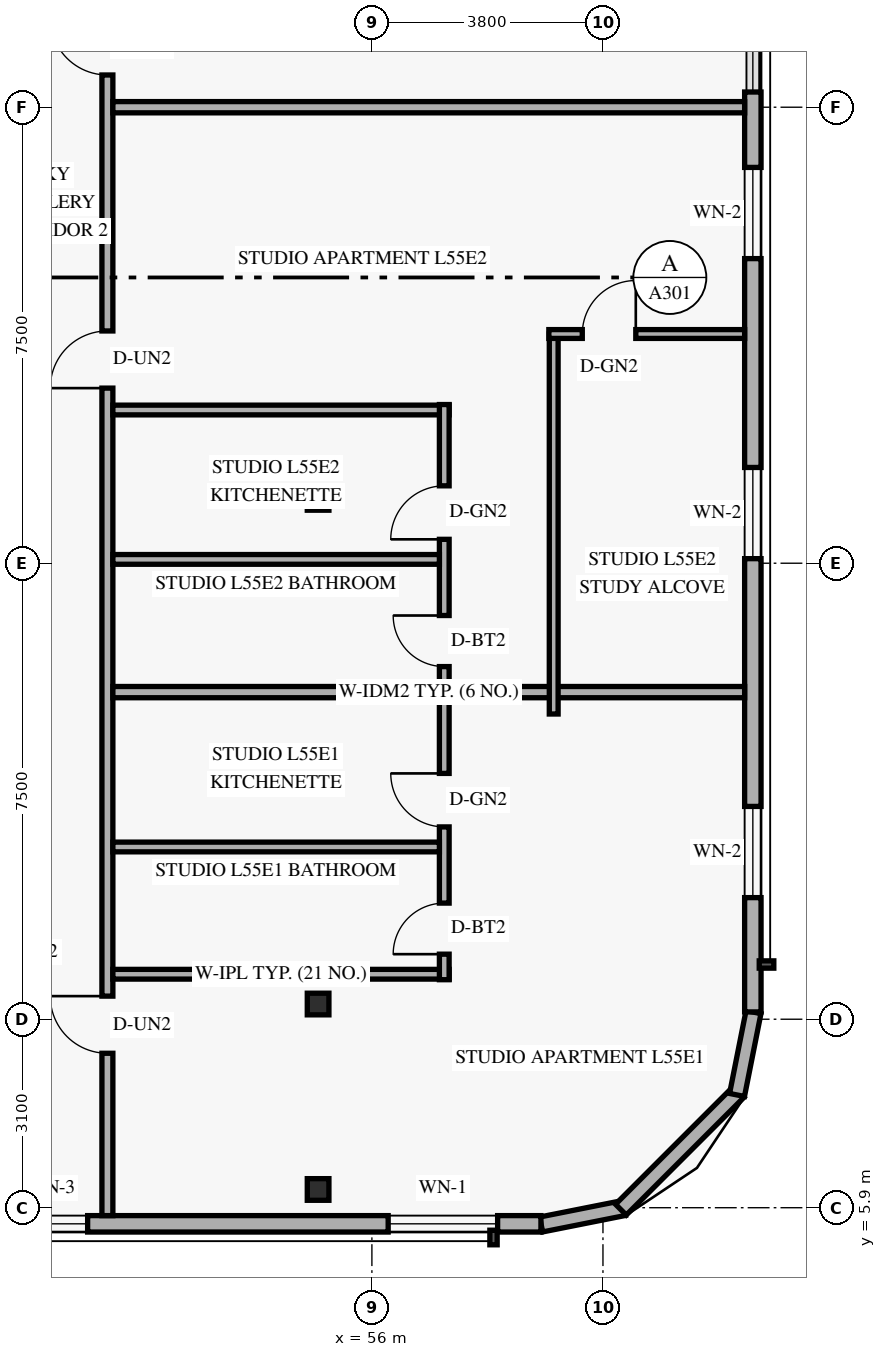
"""IFC4 building model, lengths in metres.
Left out: names, types, materials, properties, quantities, classifications, styles, units other than length and angle.
Written with IfcOpenShell. Run it as: python <this file> out.ifc"""

import sys

from ifc_helpers import new_model, si_unit, direction, frame, frame_2d, origin, origin_2d, place, context, subcontext, project, spatial, rectangle, hollow_rectangle, extrude, element, fill, save


model = new_model("IFC4")
c1 = context("Model", 3, precision=1e-05, world=origin(), true_north=direction((0.0, 1.0)))
c2 = subcontext(c1, "Body", "Model", "MODEL_VIEW")
j1 = project(units=[si_unit("LENGTHUNIT", "METRE"), si_unit("PLANEANGLEUNIT", "RADIAN")], contexts=[c1])
p1 = place(None, origin())
s1 = spatial("IfcSite", under=j1, at=p1, CompositionType="ELEMENT")
p2 = place(p1, origin())
s2 = spatial("IfcBuilding", under=s1, at=p2, CompositionType="ELEMENT")
p3 = place(p2, frame((0.0, 0.0, 213.0)))
s3 = spatial("IfcBuildingStorey", under=s2, at=p3, CompositionType="ELEMENT", Elevation=213.0)
for number, where, z_axis, x_axis in (
    (1, (55.011, 6.2, 0.0), (0.058, 0.0, 0.998), (0.0, 1.0, 0.0)),
    (2, (55.011, 9.25, 0.0), (0.058, 0.0, 0.998), (0.0, 1.0, 0.0)),
    (3, (55.011, 17.55, 0.0), (0.058, 0.0, 0.998), (0.0, 1.0, 0.0)),
):
    element("IfcColumn", number, at=place(p3, frame(where, z_axis=z_axis, x_axis=x_axis)), inside=s3, PredefinedType="COLUMN", context=c2, shape_type="SweptSolid", body=[
        extrude(hollow_rectangle(XDim=0.356, YDim=0.356, WallThickness=0.016, at=origin_2d()), origin(), (0.0, 0.0, 1.0), 3.606),
    ])
p4 = place(p3, frame((58.783, 5.624, 0.0), z_axis=(0.0, 0.0, 1.0), x_axis=(0.980809899341, 0.19496651342, 0.0)))
e4 = element("IfcWall", 4, at=p4, inside=s3, PredefinedType="SOLIDWALL", context=c2, shape_type="SweptSolid", body=[
    extrude(rectangle(XDim=1.389, YDim=0.25, at=frame_2d((0.694, 0.0))), origin(), (0.0, 0.0, 1.0), 3.36),
])
p5 = place(p3, frame((60.095, 5.868, 0.0), z_axis=(0.0, 0.0, 1.0), x_axis=(0.707106781187, 0.707106781187, 0.0)))
e5 = element("IfcWall", 5, at=p5, inside=s3, PredefinedType="SOLIDWALL", context=c2, shape_type="SweptSolid", body=[
    extrude(rectangle(XDim=2.739, YDim=0.25, at=frame_2d((1.37, 0.0))), origin(), (0.0, 0.0, 1.0), 3.36),
])
p6 = place(p3, frame((62.005, 7.754, 0.0), z_axis=(0.0, 0.0, 1.0), x_axis=(0.195135625965, 0.9807762678, 0.0)))
e6 = element("IfcWall", 6, at=p6, inside=s3, PredefinedType="SOLIDWALL", context=c2, shape_type="SweptSolid", body=[
    extrude(rectangle(XDim=1.389, YDim=0.25, at=frame_2d((0.694, 0.0))), origin(), (0.0, 0.0, 1.0), 3.36),
])
p7 = place(p3, frame((25.82, 5.635, 0.0), z_axis=(0.0, 0.0, 1.0), x_axis=(1.0, 0.0, 0.0)))
e7 = element("IfcWall", 7, at=p7, inside=s3, PredefinedType="SOLIDWALL", context=c2, shape_type="SweptSolid", body=[
    extrude(rectangle(XDim=32.96, YDim=0.27, at=frame_2d((16.48, 0.0))), origin(), (0.0, 0.0, 1.0), 3.36),
])
p8 = place(p7, frame((3.57, 0.0, 0.85)))
e8 = element("IfcOpeningElement", 8, at=p8, cuts=e7, PredefinedType="OPENING", context=c2, shape_type="SweptSolid", body=[
    extrude(rectangle(XDim=1.8, YDim=1.6, at=frame_2d((0.9, 0.8))), frame((0.0, 0.145, 0.0), z_axis=(0.0, -1.0, 0.0), x_axis=(1.0, 0.0, 0.0)), (0.0, 0.0, 1.0), 0.29),
])
p9 = place(p7, frame((18.725, 0.0, 0.85)))
e9 = element("IfcOpeningElement", 9, at=p9, cuts=e7, PredefinedType="OPENING", context=c2, shape_type="SweptSolid", body=[
    extrude(rectangle(XDim=1.8, YDim=1.6, at=frame_2d((0.9, 0.8))), frame((0.0, 0.145, 0.0), z_axis=(0.0, -1.0, 0.0), x_axis=(1.0, 0.0, 0.0)), (0.0, 0.0, 1.0), 0.29),
])
p10 = place(p7, frame((24.305, 0.0, 0.85)))
e10 = element("IfcOpeningElement", 10, at=p10, cuts=e7, PredefinedType="OPENING", context=c2, shape_type="SweptSolid", body=[
    extrude(rectangle(XDim=1.2, YDim=1.5, at=frame_2d((0.6, 0.75))), frame((0.0, 0.145, 0.0), z_axis=(0.0, -1.0, 0.0), x_axis=(1.0, 0.0, 0.0)), (0.0, 0.0, 1.0), 0.29),
])
p11 = place(p7, frame((30.448, 0.0, 0.85)))
e11 = element("IfcOpeningElement", 11, at=p11, cuts=e7, PredefinedType="OPENING", context=c2, shape_type="SweptSolid", body=[
    extrude(rectangle(XDim=1.8, YDim=1.6, at=frame_2d((0.9, 0.8))), frame((0.0, 0.145, 0.0), z_axis=(0.0, -1.0, 0.0), x_axis=(1.0, 0.0, 0.0)), (0.0, 0.0, 1.0), 0.29),
])
p12 = place(p3, frame((62.265, 9.12, 0.0), z_axis=(0.0, 0.0, 1.0), x_axis=(0.0, 1.0, 0.0)))
e12 = element("IfcWall", 12, at=p12, inside=s3, PredefinedType="SOLIDWALL", context=c2, shape_type="SweptSolid", body=[
    extrude(rectangle(XDim=15.13, YDim=0.27, at=frame_2d((7.565, 0.0))), origin(), (0.0, 0.0, 1.0), 3.36),
])
p13 = place(p12, frame((1.88, 0.0, 0.85)))
e13 = element("IfcOpeningElement", 13, at=p13, cuts=e12, PredefinedType="OPENING", context=c2, shape_type="SweptSolid", body=[
    extrude(rectangle(XDim=1.5, YDim=1.55, at=frame_2d((0.75, 0.775))), frame((0.0, 0.145, 0.0), z_axis=(0.0, -1.0, 0.0), x_axis=(1.0, 0.0, 0.0)), (0.0, 0.0, 1.0), 0.29),
])
p14 = place(p12, frame((7.455, 0.0, 0.85)))
e14 = element("IfcOpeningElement", 14, at=p14, cuts=e12, PredefinedType="OPENING", context=c2, shape_type="SweptSolid", body=[
    extrude(rectangle(XDim=1.5, YDim=1.55, at=frame_2d((0.75, 0.775))), frame((0.0, 0.145, 0.0), z_axis=(0.0, -1.0, 0.0), x_axis=(1.0, 0.0, 0.0)), (0.0, 0.0, 1.0), 0.29),
])
p15 = place(p12, frame((12.39, 0.0, 0.85)))
e15 = element("IfcOpeningElement", 15, at=p15, cuts=e12, PredefinedType="OPENING", context=c2, shape_type="SweptSolid", body=[
    extrude(rectangle(XDim=1.5, YDim=1.55, at=frame_2d((0.75, 0.775))), frame((0.0, 0.145, 0.0), z_axis=(0.0, -1.0, 0.0), x_axis=(1.0, 0.0, 0.0)), (0.0, 0.0, 1.0), 0.29),
])
p16 = place(p3, frame((51.65, 5.77, 0.0), z_axis=(0.0, 0.0, 1.0), x_axis=(0.0, 1.0, 0.0)))
e16 = element("IfcWall", 16, at=p16, inside=s3, PredefinedType="STANDARD", context=c2, shape_type="SweptSolid", body=[
    extrude(rectangle(XDim=36.46, YDim=0.18, at=frame_2d((18.23, 0.0))), origin(), (0.0, 0.0, 1.0), 2.803),
])
p17 = place(p16, frame((2.67, 0.0, 0.0)))
e17 = element("IfcOpeningElement", 17, at=p17, cuts=e16, PredefinedType="OPENING", context=c2, shape_type="SweptSolid", body=[
    extrude(rectangle(XDim=0.94, YDim=2.15, at=frame_2d((0.47, 1.075))), frame((0.0, 0.1, 0.0), z_axis=(0.0, -1.0, 0.0), x_axis=(1.0, 0.0, 0.0)), (0.0, 0.0, 1.0), 0.2),
])
p18 = place(p16, frame((13.61, 0.0, 0.0)))
e18 = element("IfcOpeningElement", 18, at=p18, cuts=e16, PredefinedType="OPENING", context=c2, shape_type="SweptSolid", body=[
    extrude(rectangle(XDim=0.94, YDim=2.15, at=frame_2d((0.47, 1.075))), frame((0.0, 0.1, 0.0), z_axis=(0.0, -1.0, 0.0), x_axis=(1.0, 0.0, 0.0)), (0.0, 0.0, 1.0), 0.2),
])
p19 = place(p16, frame((18.76, 0.0, 0.0)))
e19 = element("IfcOpeningElement", 19, at=p19, cuts=e16, PredefinedType="OPENING", context=c2, shape_type="SweptSolid", body=[
    extrude(rectangle(XDim=0.94, YDim=2.15, at=frame_2d((0.47, 1.075))), frame((0.0, 0.1, 0.0), z_axis=(0.0, -1.0, 0.0), x_axis=(1.0, 0.0, 0.0)), (0.0, 0.0, 1.0), 0.2),
])
p20 = place(p16, frame((32.75, 0.0, 0.0)))
e20 = element("IfcOpeningElement", 20, at=p20, cuts=e16, PredefinedType="OPENING", context=c2, shape_type="SweptSolid", body=[
    extrude(rectangle(XDim=0.94, YDim=2.15, at=frame_2d((0.47, 1.075))), frame((0.0, 0.1, 0.0), z_axis=(0.0, -1.0, 0.0), x_axis=(1.0, 0.0, 0.0)), (0.0, 0.0, 1.0), 0.2),
])
p21 = place(p3, frame((51.74, 9.74, 0.0), z_axis=(0.0, 0.0, 1.0), x_axis=(1.0, 0.0, 0.0)))
e21 = element("IfcWall", 21, at=p21, inside=s3, PredefinedType="PLUMBINGWALL", context=c2, shape_type="SweptSolid", body=[
    extrude(rectangle(XDim=5.53, YDim=0.16, at=frame_2d((2.765, 0.0))), origin(), (0.0, 0.0, 1.0), 2.879),
])
p22 = place(p3, frame((57.19, 9.65, 0.0), z_axis=(0.0, 0.0, 1.0), x_axis=(0.0, 1.0, 0.0)))
e22 = element("IfcWall", 22, at=p22, inside=s3, PredefinedType="PLUMBINGWALL", context=c2, shape_type="SweptSolid", body=[
    extrude(rectangle(XDim=4.73, YDim=0.16, at=frame_2d((2.365, 0.0))), origin(), (0.0, 0.0, 1.0), 3.36),
])
p23 = place(p22, frame((0.42, 0.0, 0.0)))
e23 = element("IfcOpeningElement", 23, at=p23, cuts=e22, PredefinedType="OPENING", context=c2, shape_type="SweptSolid", body=[
    extrude(rectangle(XDim=0.84, YDim=2.12, at=frame_2d((0.42, 1.06))), frame((0.0, 0.09, 0.0), z_axis=(0.0, -1.0, 0.0), x_axis=(1.0, 0.0, 0.0)), (0.0, 0.0, 1.0), 0.18),
])
p24 = place(p22, frame((2.513, 0.0, 0.0)))
e24 = element("IfcOpeningElement", 24, at=p24, cuts=e22, PredefinedType="OPENING", context=c2, shape_type="SweptSolid", body=[
    extrude(rectangle(XDim=0.88, YDim=2.12, at=frame_2d((0.44, 1.06))), frame((0.0, 0.09, 0.0), z_axis=(0.0, -1.0, 0.0), x_axis=(1.0, 0.0, 0.0)), (0.0, 0.0, 1.0), 0.18),
])
p25 = place(p3, frame((51.74, 11.833, 0.0), z_axis=(0.0, 0.0, 1.0), x_axis=(1.0, 0.0, 0.0)))
e25 = element("IfcWall", 25, at=p25, inside=s3, PredefinedType="PLUMBINGWALL", context=c2, shape_type="SweptSolid", body=[
    extrude(rectangle(XDim=5.37, YDim=0.16, at=frame_2d((2.685, 0.0))), origin(), (0.0, 0.0, 1.0), 2.879),
])
p26 = place(p3, frame((51.74, 14.38, 0.0), z_axis=(0.0, 0.0, 1.0), x_axis=(1.0, 0.0, 0.0)))
e26 = element("IfcWall", 26, at=p26, inside=s3, PredefinedType="PARTITIONING", context=c2, shape_type="SweptSolid", body=[
    extrude(rectangle(XDim=10.39, YDim=0.185, at=frame_2d((5.195, 0.0))), origin(), (0.0, 0.0, 1.0), 2.879),
])
p27 = place(p3, frame((51.74, 19.02, 0.0), z_axis=(0.0, 0.0, 1.0), x_axis=(1.0, 0.0, 0.0)))
e27 = element("IfcWall", 27, at=p27, inside=s3, PredefinedType="PLUMBINGWALL", context=c2, shape_type="SweptSolid", body=[
    extrude(rectangle(XDim=5.53, YDim=0.16, at=frame_2d((2.765, 0.0))), origin(), (0.0, 0.0, 1.0), 2.879),
])
p28 = place(p3, frame((57.19, 14.472, 0.0), z_axis=(0.0, 0.0, 1.0), x_axis=(0.0, 1.0, 0.0)))
e28 = element("IfcWall", 28, at=p28, inside=s3, PredefinedType="PLUMBINGWALL", context=c2, shape_type="SweptSolid", body=[
    extrude(rectangle(XDim=4.638, YDim=0.16, at=frame_2d((2.319, 0.0))), origin(), (0.0, 0.0, 1.0), 3.36),
])
p29 = place(p28, frame((0.327, 0.0, 0.0)))
e29 = element("IfcOpeningElement", 29, at=p29, cuts=e28, PredefinedType="OPENING", context=c2, shape_type="SweptSolid", body=[
    extrude(rectangle(XDim=0.84, YDim=2.12, at=frame_2d((0.42, 1.06))), frame((0.0, 0.09, 0.0), z_axis=(0.0, -1.0, 0.0), x_axis=(1.0, 0.0, 0.0)), (0.0, 0.0, 1.0), 0.18),
])
p30 = place(p28, frame((2.42, 0.0, 0.0)))
e30 = element("IfcOpeningElement", 30, at=p30, cuts=e28, PredefinedType="OPENING", context=c2, shape_type="SweptSolid", body=[
    extrude(rectangle(XDim=0.88, YDim=2.12, at=frame_2d((0.44, 1.06))), frame((0.0, 0.09, 0.0), z_axis=(0.0, -1.0, 0.0), x_axis=(1.0, 0.0, 0.0)), (0.0, 0.0, 1.0), 0.18),
])
p31 = place(p3, frame((51.74, 16.563, 0.0), z_axis=(0.0, 0.0, 1.0), x_axis=(1.0, 0.0, 0.0)))
e31 = element("IfcWall", 31, at=p31, inside=s3, PredefinedType="PLUMBINGWALL", context=c2, shape_type="SweptSolid", body=[
    extrude(rectangle(XDim=5.37, YDim=0.16, at=frame_2d((2.685, 0.0))), origin(), (0.0, 0.0, 1.0), 2.879),
])
p32 = place(p3, frame((58.99, 14.02, 0.0), z_axis=(0.0, 0.0, 1.0), x_axis=(0.0, 1.0, 0.0)))
e32 = element("IfcWall", 32, at=p32, inside=s3, PredefinedType="PARTITIONING", context=c2, shape_type="SweptSolid", body=[
    extrude(rectangle(XDim=6.25, YDim=0.145, at=frame_2d((3.125, 0.0))), origin(), (0.0, 0.0, 1.0), 3.36),
])
p33 = place(p3, frame((58.91, 20.27, 0.0), z_axis=(0.0, 0.0, 1.0), x_axis=(1.0, 0.0, 0.0)))
e33 = element("IfcWall", 33, at=p33, inside=s3, PredefinedType="PARTITIONING", context=c2, shape_type="SweptSolid", body=[
    extrude(rectangle(XDim=3.22, YDim=0.145, at=frame_2d((1.61, 0.0))), origin(), (0.0, 0.0, 1.0), 3.36),
])
p34 = place(p33, frame((0.55, 0.0, 0.0)))
e34 = element("IfcOpeningElement", 34, at=p34, cuts=e33, PredefinedType="OPENING", context=c2, shape_type="SweptSolid", body=[
    extrude(rectangle(XDim=0.88, YDim=2.12, at=frame_2d((0.44, 1.06))), frame((0.0, 0.083, 0.0), z_axis=(0.0, -1.0, 0.0), x_axis=(1.0, 0.0, 0.0)), (0.0, 0.0, 1.0), 0.165),
])
p35 = place(p3, frame((51.74, 24.0, 0.0), z_axis=(0.0, 0.0, 1.0), x_axis=(1.0, 0.0, 0.0)))
e35 = element("IfcWall", 35, at=p35, inside=s3, PredefinedType="PARTITIONING", context=c2, shape_type="SweptSolid", body=[
    extrude(rectangle(XDim=10.39, YDim=0.185, at=frame_2d((5.195, 0.0))), origin(), (0.0, 0.0, 1.0), 2.879),
])
p36 = place(p10, origin())
e36 = element("IfcWindow", 36, at=p36, inside=s3, PartitioningType="SINGLE_PANEL", PredefinedType="WINDOW", context=c2, shape_type="SweptSolid", body=[
    extrude(rectangle(XDim=1.2, YDim=1.5, at=frame_2d((0.6, 0.75))), frame((0.0, 0.03, 0.0), z_axis=(0.0, -1.0, 0.0), x_axis=(1.0, 0.0, 0.0)), (0.0, 0.0, 1.0), 0.06),
])
fill(e10, e36)
p37 = place(p11, origin())
e37 = element("IfcWindow", 37, at=p37, inside=s3, PartitioningType="SINGLE_PANEL", PredefinedType="WINDOW", context=c2, shape_type="SweptSolid", body=[
    extrude(rectangle(XDim=1.8, YDim=1.6, at=frame_2d((0.9, 0.8))), frame((0.0, 0.03, 0.0), z_axis=(0.0, -1.0, 0.0), x_axis=(1.0, 0.0, 0.0)), (0.0, 0.0, 1.0), 0.06),
])
fill(e11, e37)
p38 = place(p13, origin())
e38 = element("IfcWindow", 38, at=p38, inside=s3, PartitioningType="SINGLE_PANEL", PredefinedType="WINDOW", context=c2, shape_type="SweptSolid", body=[
    extrude(rectangle(XDim=1.5, YDim=1.55, at=frame_2d((0.75, 0.775))), frame((0.0, 0.03, 0.0), z_axis=(0.0, -1.0, 0.0), x_axis=(1.0, 0.0, 0.0)), (0.0, 0.0, 1.0), 0.06),
])
fill(e13, e38)
p39 = place(p14, origin())
e39 = element("IfcWindow", 39, at=p39, inside=s3, PartitioningType="SINGLE_PANEL", PredefinedType="WINDOW", context=c2, shape_type="SweptSolid", body=[
    extrude(rectangle(XDim=1.5, YDim=1.55, at=frame_2d((0.75, 0.775))), frame((0.0, 0.03, 0.0), z_axis=(0.0, -1.0, 0.0), x_axis=(1.0, 0.0, 0.0)), (0.0, 0.0, 1.0), 0.06),
])
fill(e14, e39)
p40 = place(p15, origin())
e40 = element("IfcWindow", 40, at=p40, inside=s3, PartitioningType="SINGLE_PANEL", PredefinedType="WINDOW", context=c2, shape_type="SweptSolid", body=[
    extrude(rectangle(XDim=1.5, YDim=1.55, at=frame_2d((0.75, 0.775))), frame((0.0, 0.03, 0.0), z_axis=(0.0, -1.0, 0.0), x_axis=(1.0, 0.0, 0.0)), (0.0, 0.0, 1.0), 0.06),
])
fill(e15, e40)
p41 = place(p17, origin())
e41 = element("IfcDoor", 41, at=p41, inside=s3, OperationType="SINGLE_SWING_RIGHT", PredefinedType="DOOR", context=c2, shape_type="SweptSolid", body=[
    extrude(rectangle(XDim=0.94, YDim=2.15, at=frame_2d((0.47, 1.075))), frame((0.0, 0.025, 0.0), z_axis=(0.0, -1.0, 0.0), x_axis=(1.0, 0.0, 0.0)), (0.0, 0.0, 1.0), 0.05),
])
fill(e17, e41)
p42 = place(p23, origin())
e42 = element("IfcDoor", 42, at=p42, inside=s3, OperationType="SINGLE_SWING_LEFT", PredefinedType="DOOR", context=c2, shape_type="SweptSolid", body=[
    extrude(rectangle(XDim=0.84, YDim=2.12, at=frame_2d((0.42, 1.06))), frame((0.0, 0.025, 0.0), z_axis=(0.0, -1.0, 0.0), x_axis=(1.0, 0.0, 0.0)), (0.0, 0.0, 1.0), 0.05),
])
fill(e23, e42)
p43 = place(p24, origin())
e43 = element("IfcDoor", 43, at=p43, inside=s3, OperationType="SINGLE_SWING_RIGHT", PredefinedType="DOOR", context=c2, shape_type="SweptSolid", body=[
    extrude(rectangle(XDim=0.88, YDim=2.12, at=frame_2d((0.44, 1.06))), frame((0.0, 0.025, 0.0), z_axis=(0.0, -1.0, 0.0), x_axis=(1.0, 0.0, 0.0)), (0.0, 0.0, 1.0), 0.05),
])
fill(e24, e43)
p44 = place(p34, origin())
e44 = element("IfcDoor", 44, at=p44, inside=s3, OperationType="SINGLE_SWING_RIGHT", PredefinedType="DOOR", context=c2, shape_type="SweptSolid", body=[
    extrude(rectangle(XDim=0.88, YDim=2.12, at=frame_2d((0.44, 1.06))), frame((0.0, 0.025, 0.0), z_axis=(0.0, -1.0, 0.0), x_axis=(1.0, 0.0, 0.0)), (0.0, 0.0, 1.0), 0.05),
])
fill(e34, e44)
p45 = place(p18, origin())
e45 = element("IfcDoor", 45, at=p45, inside=s3, OperationType="SINGLE_SWING_LEFT", PredefinedType="DOOR", context=c2, shape_type="SweptSolid", body=[
    extrude(rectangle(XDim=0.94, YDim=2.15, at=frame_2d((0.47, 1.075))), frame((0.0, 0.025, 0.0), z_axis=(0.0, -1.0, 0.0), x_axis=(1.0, 0.0, 0.0)), (0.0, 0.0, 1.0), 0.05),
])
fill(e18, e45)
p46 = place(p29, origin())
e46 = element("IfcDoor", 46, at=p46, inside=s3, OperationType="SINGLE_SWING_RIGHT", PredefinedType="DOOR", context=c2, shape_type="SweptSolid", body=[
    extrude(rectangle(XDim=0.84, YDim=2.12, at=frame_2d((0.42, 1.06))), frame((0.0, 0.025, 0.0), z_axis=(0.0, -1.0, 0.0), x_axis=(1.0, 0.0, 0.0)), (0.0, 0.0, 1.0), 0.05),
])
fill(e29, e46)
p47 = place(p30, origin())
e47 = element("IfcDoor", 47, at=p47, inside=s3, OperationType="SINGLE_SWING_LEFT", PredefinedType="DOOR", context=c2, shape_type="SweptSolid", body=[
    extrude(rectangle(XDim=0.88, YDim=2.12, at=frame_2d((0.44, 1.06))), frame((0.0, 0.025, 0.0), z_axis=(0.0, -1.0, 0.0), x_axis=(1.0, 0.0, 0.0)), (0.0, 0.0, 1.0), 0.05),
])
fill(e30, e47)
p48 = place(p19, origin())
e48 = element("IfcDoor", 48, at=p48, inside=s3, OperationType="SINGLE_SWING_RIGHT", PredefinedType="DOOR", context=c2, shape_type="SweptSolid", body=[
    extrude(rectangle(XDim=0.94, YDim=2.15, at=frame_2d((0.47, 1.075))), frame((0.0, 0.025, 0.0), z_axis=(0.0, -1.0, 0.0), x_axis=(1.0, 0.0, 0.0)), (0.0, 0.0, 1.0), 0.05),
])
fill(e19, e48)
save(model, sys.argv[1])
